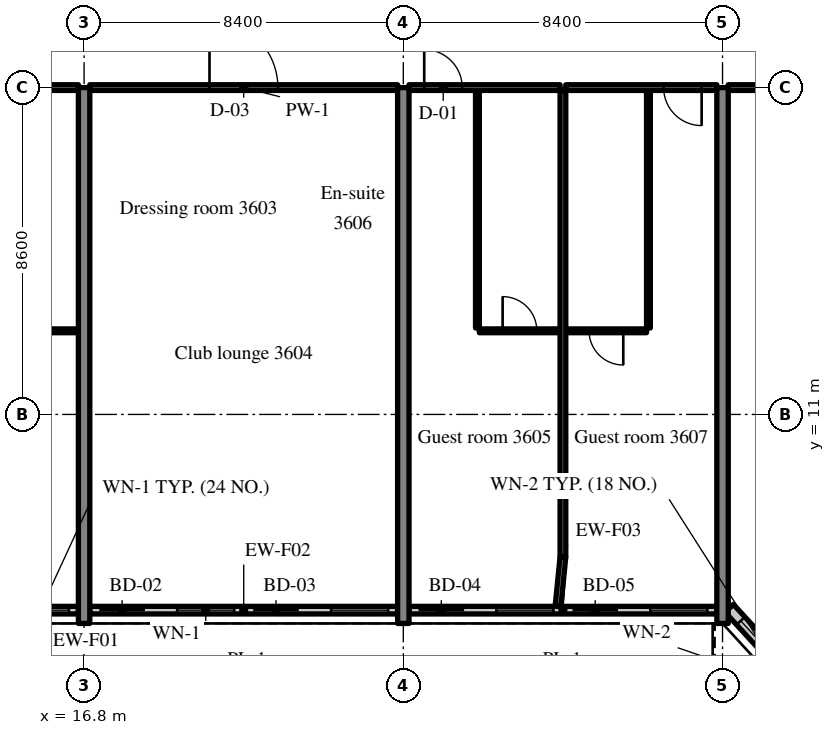
"""IFC4 building model, lengths in metres.
Left out: names, types, materials, properties, quantities, classifications, styles, units other than length and angle.
Written with IfcOpenShell. Run it as: python <this file> out.ifc"""

import sys

from ifc_helpers import new_model, si_unit, direction, frame, frame_2d, origin, place, context, subcontext, project, spatial, rectangle, extrude, source, transform, mapped, element, fill, save


model = new_model("IFC4")
c1 = context("Model", 3, precision=1e-05, world=origin(), true_north=direction((0.0, 1.0)))
c2 = subcontext(c1, "Body", "Model", "MODEL_VIEW")
j1 = project(units=[si_unit("LENGTHUNIT", "METRE"), si_unit("PLANEANGLEUNIT", "RADIAN")], contexts=[c1])
p1 = place(None, origin())
s1 = spatial("IfcSite", under=j1, at=p1, CompositionType="ELEMENT")
p2 = place(p1, origin())
s2 = spatial("IfcBuilding", under=s1, at=p2, CompositionType="ELEMENT")
p3 = place(p2, frame((0.0, 0.0, 151.6)))
s3 = spatial("IfcBuildingStorey", under=s2, at=p3, CompositionType="ELEMENT", Elevation=151.6)
m1 = source(origin(), c2, "Body", "SweptSolid", [
    extrude(rectangle(XDim=14.1, YDim=0.3, at=frame_2d((7.05, 0.0))), origin(), (0.0, 0.0, 1.0), 3.52),
])
for number, where, z_axis, x_axis in (
    (1, (16.8, 5.5, 0.0), (0.0, 0.0, 1.0), (0.0, 1.0, 0.0)),
    (2, (25.2, 5.5, 0.0), (0.0, 0.0, 1.0), (0.0, 1.0, 0.0)),
    (3, (33.6, 5.5, 0.0), (0.0, 0.0, 1.0), (0.0, 1.0, 0.0)),
):
    element("IfcWall", number, at=place(p3, frame(where, z_axis=z_axis, x_axis=x_axis)), inside=s3, PredefinedType="SHEAR", context=c2, shape_type="MappedRepresentation", body=[
        mapped(m1, transform((0.0, 0.0, 0.0), scale=1.0)),
    ])
m2 = source(origin(), c2, "Body", "SweptSolid", [
    extrude(rectangle(XDim=4.105, YDim=0.2, at=frame_2d((2.052, 0.0))), origin(), (0.0, 0.0, 1.0), 2.87),
])
p4 = place(p3, frame((12.545, 5.85, 0.0), z_axis=(0.0, 0.0, 1.0), x_axis=(1.0, 0.0, 0.0)))
e4 = element("IfcWall", 4, at=p4, inside=s3, PredefinedType="SOLIDWALL", context=c2, shape_type="MappedRepresentation", body=[
    mapped(m2, transform((0.0, 0.0, 0.0), scale=1.0)),
])
m3 = source(origin(), c2, "Body", "SweptSolid", [
    extrude(rectangle(XDim=1.2, YDim=2.4, at=frame_2d((0.6, 1.2))), frame((0.0, 0.11, 0.0), z_axis=(0.0, -1.0, 0.0), x_axis=(1.0, 0.0, 0.0)), (0.0, 0.0, 1.0), 0.22),
])
p5 = place(p4, frame((0.25, 0.0, 0.0)))
e5 = element("IfcOpeningElement", 5, at=p5, cuts=e4, PredefinedType="OPENING", context=c2, shape_type="MappedRepresentation", body=[
    mapped(m3, transform((0.0, 0.0, 0.0), scale=1.0)),
])
m4 = source(origin(), c2, "Body", "SweptSolid", [
    extrude(rectangle(XDim=1.5, YDim=1.5, at=frame_2d((0.75, 0.75))), frame((0.0, 0.11, 0.0), z_axis=(0.0, -1.0, 0.0), x_axis=(1.0, 0.0, 0.0)), (0.0, 0.0, 1.0), 0.22),
])
p6 = place(p4, frame((2.355, 0.0, 0.9)))
e6 = element("IfcOpeningElement", 6, at=p6, cuts=e4, PredefinedType="OPENING", context=c2, shape_type="MappedRepresentation", body=[
    mapped(m4, transform((0.0, 0.0, 0.0), scale=1.0)),
])
m5 = source(origin(), c2, "Body", "SweptSolid", [
    extrude(rectangle(XDim=8.1, YDim=0.2, at=frame_2d((4.05, 0.0))), origin(), (0.0, 0.0, 1.0), 2.87),
])
p7 = place(p3, frame((16.95, 5.85, 0.0), z_axis=(0.0, 0.0, 1.0), x_axis=(1.0, 0.0, 0.0)))
e7 = element("IfcWall", 7, at=p7, inside=s3, PredefinedType="SOLIDWALL", context=c2, shape_type="MappedRepresentation", body=[
    mapped(m5, transform((0.0, 0.0, 0.0), scale=1.0)),
])
p8 = place(p7, frame((0.25, 0.0, 0.0)))
e8 = element("IfcOpeningElement", 8, at=p8, cuts=e7, PredefinedType="OPENING", context=c2, shape_type="MappedRepresentation", body=[
    mapped(m3, transform((0.0, 0.0, 0.0), scale=1.0)),
])
p9 = place(p7, frame((2.3, 0.0, 0.9)))
e9 = element("IfcOpeningElement", 9, at=p9, cuts=e7, PredefinedType="OPENING", context=c2, shape_type="MappedRepresentation", body=[
    mapped(m4, transform((0.0, 0.0, 0.0), scale=1.0)),
])
p10 = place(p7, frame((4.3, 0.0, 0.0)))
e10 = element("IfcOpeningElement", 10, at=p10, cuts=e7, PredefinedType="OPENING", context=c2, shape_type="MappedRepresentation", body=[
    mapped(m3, transform((0.0, 0.0, 0.0), scale=1.0)),
])
p11 = place(p7, frame((6.35, 0.0, 0.9)))
e11 = element("IfcOpeningElement", 11, at=p11, cuts=e7, PredefinedType="OPENING", context=c2, shape_type="MappedRepresentation", body=[
    mapped(m4, transform((0.0, 0.0, 0.0), scale=1.0)),
])
m6 = source(origin(), c2, "Body", "SweptSolid", [
    extrude(rectangle(XDim=8.1, YDim=0.2, at=frame_2d((4.05, 0.0))), origin(), (0.0, 0.0, 1.0), 2.87),
])
p12 = place(p3, frame((25.35, 5.85, 0.0), z_axis=(0.0, 0.0, 1.0), x_axis=(1.0, 0.0, 0.0)))
e12 = element("IfcWall", 12, at=p12, inside=s3, PredefinedType="SOLIDWALL", context=c2, shape_type="MappedRepresentation", body=[
    mapped(m6, transform((0.0, 0.0, 0.0), scale=1.0)),
])
p13 = place(p12, frame((0.25, 0.0, 0.0)))
e13 = element("IfcOpeningElement", 13, at=p13, cuts=e12, PredefinedType="OPENING", context=c2, shape_type="MappedRepresentation", body=[
    mapped(m3, transform((0.0, 0.0, 0.0), scale=1.0)),
])
p14 = place(p12, frame((2.3, 0.0, 0.9)))
e14 = element("IfcOpeningElement", 14, at=p14, cuts=e12, PredefinedType="OPENING", context=c2, shape_type="MappedRepresentation", body=[
    mapped(m4, transform((0.0, 0.0, 0.0), scale=1.0)),
])
p15 = place(p12, frame((4.3, 0.0, 0.0)))
e15 = element("IfcOpeningElement", 15, at=p15, cuts=e12, PredefinedType="OPENING", context=c2, shape_type="MappedRepresentation", body=[
    mapped(m3, transform((0.0, 0.0, 0.0), scale=1.0)),
])
p16 = place(p12, frame((6.35, 0.0, 0.9)))
e16 = element("IfcOpeningElement", 16, at=p16, cuts=e12, PredefinedType="OPENING", context=c2, shape_type="MappedRepresentation", body=[
    mapped(m4, transform((0.0, 0.0, 0.0), scale=1.0)),
])
m7 = source(origin(), c2, "Body", "SweptSolid", [
    extrude(rectangle(XDim=2.398, YDim=0.3, at=frame_2d((1.199, 0.0))), origin(), (0.0, 0.0, 1.0), 3.52),
])
p17 = place(p3, frame((33.776, 5.9, 0.0), z_axis=(0.0, 0.0, 1.0), x_axis=(0.675374189419, -0.737475222815, 0.0)))
e17 = element("IfcWall", 17, at=p17, inside=s3, PredefinedType="SOLIDWALL", context=c2, shape_type="MappedRepresentation", body=[
    mapped(m7, transform((0.0, 0.0, 0.0), scale=1.0)),
])
m8 = source(origin(), c2, "Body", "SweptSolid", [
    extrude(rectangle(XDim=1.5, YDim=2.0, at=frame_2d((0.75, 1.0))), frame((0.0, 0.16, 0.0), z_axis=(0.0, -1.0, 0.0), x_axis=(1.0, 0.0, 0.0)), (0.0, 0.0, 1.0), 0.32),
])
p18 = place(p17, frame((0.449, 0.0, 0.9)))
e18 = element("IfcOpeningElement", 18, at=p18, cuts=e17, PredefinedType="OPENING", context=c2, shape_type="MappedRepresentation", body=[
    mapped(m8, transform((0.0, 0.0, 0.0), scale=1.0)),
])
m9 = source(origin(), c2, "Body", "SweptSolid", [
    extrude(rectangle(XDim=2.5, YDim=0.1, at=frame_2d((1.25, 0.0))), origin(), (0.0, 0.0, 1.0), 3.52),
])
p19 = place(p3, frame((14.15, 13.2, 0.0), z_axis=(0.0, 0.0, 1.0), x_axis=(1.0, 0.0, 0.0)))
e19 = element("IfcWall", 19, at=p19, inside=s3, PredefinedType="PARTITIONING", context=c2, shape_type="MappedRepresentation", body=[
    mapped(m9, transform((0.0, 0.0, 0.0), scale=1.0)),
])
m10 = source(origin(), c2, "Body", "SweptSolid", [
    extrude(rectangle(XDim=0.9, YDim=2.1, at=frame_2d((0.45, 1.05))), frame((0.0, 0.06, 0.0), z_axis=(0.0, -1.0, 0.0), x_axis=(1.0, 0.0, 0.0)), (0.0, 0.0, 1.0), 0.12),
])
p20 = place(p19, frame((0.8, 0.0, 0.0)))
e20 = element("IfcOpeningElement", 20, at=p20, cuts=e19, PredefinedType="OPENING", context=c2, shape_type="MappedRepresentation", body=[
    mapped(m10, transform((0.0, 0.0, 0.0), scale=1.0)),
])
m11 = source(origin(), c2, "Body", "SweptSolid", [
    extrude(rectangle(XDim=7.95, YDim=0.15, at=frame_2d((3.975, 0.0))), origin(), (0.0, 0.0, 1.0), 2.82),
])
p21 = place(p3, frame((8.7, 19.6, 0.0), z_axis=(0.0, 0.0, 1.0), x_axis=(1.0, 0.0, 0.0)))
e21 = element("IfcWall", 21, at=p21, inside=s3, PredefinedType="PARTITIONING", context=c2, shape_type="MappedRepresentation", body=[
    mapped(m11, transform((0.0, 0.0, 0.0), scale=1.0)),
])
m12 = source(origin(), c2, "Body", "SweptSolid", [
    extrude(rectangle(XDim=1.0, YDim=2.1, at=frame_2d((0.5, 1.05))), frame((0.0, 0.085, 0.0), z_axis=(0.0, -1.0, 0.0), x_axis=(1.0, 0.0, 0.0)), (0.0, 0.0, 1.0), 0.17),
])
p22 = place(p21, frame((0.4, 0.0, 0.0)))
e22 = element("IfcOpeningElement", 22, at=p22, cuts=e21, PredefinedType="OPENING", context=c2, shape_type="MappedRepresentation", body=[
    mapped(m12, transform((0.0, 0.0, 0.0), scale=1.0)),
])
m13 = source(origin(), c2, "Body", "SweptSolid", [
    extrude(rectangle(XDim=8.1, YDim=0.15, at=frame_2d((4.05, 0.0))), origin(), (0.0, 0.0, 1.0), 2.82),
])
p23 = place(p3, frame((16.95, 19.6, 0.0), z_axis=(0.0, 0.0, 1.0), x_axis=(1.0, 0.0, 0.0)))
e23 = element("IfcWall", 23, at=p23, inside=s3, PredefinedType="PARTITIONING", context=c2, shape_type="MappedRepresentation", body=[
    mapped(m13, transform((0.0, 0.0, 0.0), scale=1.0)),
])
m14 = source(origin(), c2, "Body", "SweptSolid", [
    extrude(rectangle(XDim=1.8, YDim=2.1, at=frame_2d((0.9, 1.05))), frame((0.0, 0.085, 0.0), z_axis=(0.0, -1.0, 0.0), x_axis=(1.0, 0.0, 0.0)), (0.0, 0.0, 1.0), 0.17),
])
p24 = place(p23, frame((3.15, 0.0, 0.0)))
e24 = element("IfcOpeningElement", 24, at=p24, cuts=e23, PredefinedType="OPENING", context=c2, shape_type="MappedRepresentation", body=[
    mapped(m14, transform((0.0, 0.0, 0.0), scale=1.0)),
])
m15 = source(origin(), c2, "Body", "SweptSolid", [
    extrude(rectangle(XDim=6.25, YDim=0.1, at=frame_2d((3.125, 0.0))), origin(), (0.0, 0.0, 1.0), 3.52),
])
p25 = place(p3, frame((27.15, 13.275, 0.0), z_axis=(0.0, 0.0, 1.0), x_axis=(0.0, 1.0, 0.0)))
e25 = element("IfcWall", 25, at=p25, inside=s3, PredefinedType="PARTITIONING", context=c2, shape_type="MappedRepresentation", body=[
    mapped(m15, transform((0.0, 0.0, 0.0), scale=1.0)),
])
m16 = source(origin(), c2, "Body", "SweptSolid", [
    extrude(rectangle(XDim=2.125, YDim=0.1, at=frame_2d((1.062, 0.0))), origin(), (0.0, 0.0, 1.0), 3.52),
])
p26 = place(p3, frame((27.2, 13.2, 0.0), z_axis=(0.0, 0.0, 1.0), x_axis=(1.0, 0.0, 0.0)))
e26 = element("IfcWall", 26, at=p26, inside=s3, PredefinedType="PARTITIONING", context=c2, shape_type="MappedRepresentation", body=[
    mapped(m16, transform((0.0, 0.0, 0.0), scale=1.0)),
])
p27 = place(p26, frame((0.613, 0.0, 0.0)))
e27 = element("IfcOpeningElement", 27, at=p27, cuts=e26, PredefinedType="OPENING", context=c2, shape_type="MappedRepresentation", body=[
    mapped(m10, transform((0.0, 0.0, 0.0), scale=1.0)),
])
m17 = source(origin(), c2, "Body", "SweptSolid", [
    extrude(rectangle(XDim=3.975, YDim=0.15, at=frame_2d((1.987, 0.0))), origin(), (0.0, 0.0, 1.0), 2.82),
])
p28 = place(p3, frame((25.35, 19.6, 0.0), z_axis=(0.0, 0.0, 1.0), x_axis=(1.0, 0.0, 0.0)))
e28 = element("IfcWall", 28, at=p28, inside=s3, PredefinedType="PARTITIONING", context=c2, shape_type="MappedRepresentation", body=[
    mapped(m17, transform((0.0, 0.0, 0.0), scale=1.0)),
])
p29 = place(p28, frame((0.4, 0.0, 0.0)))
e29 = element("IfcOpeningElement", 29, at=p29, cuts=e28, PredefinedType="OPENING", context=c2, shape_type="MappedRepresentation", body=[
    mapped(m12, transform((0.0, 0.0, 0.0), scale=1.0)),
])
p30 = place(p3, frame((31.65, 13.275, 0.0), z_axis=(0.0, 0.0, 1.0), x_axis=(0.0, 1.0, 0.0)))
e30 = element("IfcWall", 30, at=p30, inside=s3, PredefinedType="PARTITIONING", context=c2, shape_type="MappedRepresentation", body=[
    mapped(m15, transform((0.0, 0.0, 0.0), scale=1.0)),
])
p31 = place(p3, frame((29.475, 13.2, 0.0), z_axis=(0.0, 0.0, 1.0), x_axis=(1.0, 0.0, 0.0)))
e31 = element("IfcWall", 31, at=p31, inside=s3, PredefinedType="PARTITIONING", context=c2, shape_type="MappedRepresentation", body=[
    mapped(m16, transform((0.0, 0.0, 0.0), scale=1.0)),
])
p32 = place(p31, frame((0.613, 0.0, 0.0)))
e32 = element("IfcOpeningElement", 32, at=p32, cuts=e31, PredefinedType="OPENING", context=c2, shape_type="MappedRepresentation", body=[
    mapped(m10, transform((0.0, 0.0, 0.0), scale=1.0)),
])
p33 = place(p3, frame((29.475, 19.6, 0.0), z_axis=(0.0, 0.0, 1.0), x_axis=(1.0, 0.0, 0.0)))
e33 = element("IfcWall", 33, at=p33, inside=s3, PredefinedType="PARTITIONING", context=c2, shape_type="MappedRepresentation", body=[
    mapped(m17, transform((0.0, 0.0, 0.0), scale=1.0)),
])
p34 = place(p33, frame((2.575, 0.0, 0.0)))
e34 = element("IfcOpeningElement", 34, at=p34, cuts=e33, PredefinedType="OPENING", context=c2, shape_type="MappedRepresentation", body=[
    mapped(m12, transform((0.0, 0.0, 0.0), scale=1.0)),
])
m18 = source(origin(), c2, "Body", "SweptSolid", [
    extrude(rectangle(XDim=12.275, YDim=0.15, at=frame_2d((6.137, 0.0))), origin(), (0.0, 0.0, 1.0), 3.52),
])
p35 = place(p3, frame((29.4, 7.25, 0.0), z_axis=(0.0, 0.0, 1.0), x_axis=(0.0, 1.0, 0.0)))
e35 = element("IfcWall", 35, at=p35, inside=s3, PredefinedType="PARTITIONING", context=c2, shape_type="MappedRepresentation", body=[
    mapped(m18, transform((0.0, 0.0, 0.0), scale=1.0)),
])
p36 = place(p3, frame((33.75, 19.6, 0.0), z_axis=(0.0, 0.0, 1.0), x_axis=(1.0, 0.0, 0.0)))
e36 = element("IfcWall", 36, at=p36, inside=s3, PredefinedType="PARTITIONING", context=c2, shape_type="MappedRepresentation", body=[
    mapped(m13, transform((0.0, 0.0, 0.0), scale=1.0)),
])
p37 = place(p36, frame((3.15, 0.0, 0.0)))
e37 = element("IfcOpeningElement", 37, at=p37, cuts=e36, PredefinedType="OPENING", context=c2, shape_type="MappedRepresentation", body=[
    mapped(m14, transform((0.0, 0.0, 0.0), scale=1.0)),
])
m19 = source(origin(), c2, "Body", "SweptSolid", [
    extrude(rectangle(XDim=1.307, YDim=0.15, at=frame_2d((0.653, 0.0))), origin(), (0.0, 0.0, 1.0), 3.52),
])
p38 = place(p3, frame((29.27, 5.95, 0.0), z_axis=(0.0, 0.0, 1.0), x_axis=(0.099411212066, 0.995046436562, 0.0)))
e38 = element("IfcWall", 38, at=p38, inside=s3, PredefinedType="PARTITIONING", context=c2, shape_type="MappedRepresentation", body=[
    mapped(m19, transform((0.0, 0.0, 0.0), scale=1.0)),
])
m20 = source(origin(), c2, "Body", "SweptSolid", [
    extrude(rectangle(XDim=1.5, YDim=1.5, at=frame_2d((0.75, 0.75))), frame((0.0, 0.03, 0.0), z_axis=(0.0, -1.0, 0.0), x_axis=(1.0, 0.0, 0.0)), (0.0, 0.0, 1.0), 0.06),
])
p39 = place(p6, origin())
e39 = element("IfcWindow", 39, at=p39, inside=s3, PartitioningType="SINGLE_PANEL", PredefinedType="WINDOW", context=c2, shape_type="MappedRepresentation", body=[
    mapped(m20, transform((0.0, 0.0, 0.0), scale=1.0)),
])
fill(e6, e39)
m21 = source(origin(), c2, "Body", "SweptSolid", [
    extrude(rectangle(XDim=1.2, YDim=2.4, at=frame_2d((0.6, 1.2))), frame((0.0, 0.025, 0.0), z_axis=(0.0, -1.0, 0.0), x_axis=(1.0, 0.0, 0.0)), (0.0, 0.0, 1.0), 0.05),
])
p40 = place(p8, origin())
e40 = element("IfcDoor", 40, at=p40, inside=s3, OperationType="SLIDING_TO_RIGHT", PredefinedType="DOOR", context=c2, shape_type="MappedRepresentation", body=[
    mapped(m21, transform((0.0, 0.0, 0.0), scale=1.0)),
])
fill(e8, e40)
p41 = place(p9, origin())
e41 = element("IfcWindow", 41, at=p41, inside=s3, PartitioningType="SINGLE_PANEL", PredefinedType="WINDOW", context=c2, shape_type="MappedRepresentation", body=[
    mapped(m20, transform((0.0, 0.0, 0.0), scale=1.0)),
])
fill(e9, e41)
p42 = place(p10, origin())
e42 = element("IfcDoor", 42, at=p42, inside=s3, OperationType="SLIDING_TO_LEFT", PredefinedType="DOOR", context=c2, shape_type="MappedRepresentation", body=[
    mapped(m21, transform((0.0, 0.0, 0.0), scale=1.0)),
])
fill(e10, e42)
p43 = place(p11, origin())
e43 = element("IfcWindow", 43, at=p43, inside=s3, PartitioningType="SINGLE_PANEL", PredefinedType="WINDOW", context=c2, shape_type="MappedRepresentation", body=[
    mapped(m20, transform((0.0, 0.0, 0.0), scale=1.0)),
])
fill(e11, e43)
p44 = place(p13, origin())
e44 = element("IfcDoor", 44, at=p44, inside=s3, OperationType="SLIDING_TO_RIGHT", PredefinedType="DOOR", context=c2, shape_type="MappedRepresentation", body=[
    mapped(m21, transform((0.0, 0.0, 0.0), scale=1.0)),
])
fill(e13, e44)
p45 = place(p14, origin())
e45 = element("IfcWindow", 45, at=p45, inside=s3, PartitioningType="SINGLE_PANEL", PredefinedType="WINDOW", context=c2, shape_type="MappedRepresentation", body=[
    mapped(m20, transform((0.0, 0.0, 0.0), scale=1.0)),
])
fill(e14, e45)
p46 = place(p15, origin())
e46 = element("IfcDoor", 46, at=p46, inside=s3, OperationType="SLIDING_TO_LEFT", PredefinedType="DOOR", context=c2, shape_type="MappedRepresentation", body=[
    mapped(m21, transform((0.0, 0.0, 0.0), scale=1.0)),
])
fill(e15, e46)
p47 = place(p16, origin())
e47 = element("IfcWindow", 47, at=p47, inside=s3, PartitioningType="SINGLE_PANEL", PredefinedType="WINDOW", context=c2, shape_type="MappedRepresentation", body=[
    mapped(m20, transform((0.0, 0.0, 0.0), scale=1.0)),
])
fill(e16, e47)
m22 = source(origin(), c2, "Body", "SweptSolid", [
    extrude(rectangle(XDim=1.5, YDim=2.0, at=frame_2d((0.75, 1.0))), frame((0.0, 0.03, 0.0), z_axis=(0.0, -1.0, 0.0), x_axis=(1.0, 0.0, 0.0)), (0.0, 0.0, 1.0), 0.06),
])
p48 = place(p18, origin())
e48 = element("IfcWindow", 48, at=p48, inside=s3, PartitioningType="SINGLE_PANEL", PredefinedType="WINDOW", context=c2, shape_type="MappedRepresentation", body=[
    mapped(m22, transform((0.0, 0.0, 0.0), scale=1.0)),
])
fill(e18, e48)
m23 = source(origin(), c2, "Body", "SweptSolid", [
    extrude(rectangle(XDim=1.8, YDim=2.1, at=frame_2d((0.9, 1.05))), frame((0.0, 0.025, 0.0), z_axis=(0.0, -1.0, 0.0), x_axis=(1.0, 0.0, 0.0)), (0.0, 0.0, 1.0), 0.05),
])
p49 = place(p24, origin())
e49 = element("IfcDoor", 49, at=p49, inside=s3, OperationType="DOUBLE_DOOR_SINGLE_SWING", PredefinedType="DOOR", context=c2, shape_type="MappedRepresentation", body=[
    mapped(m23, transform((0.0, 0.0, 0.0), scale=1.0)),
])
fill(e24, e49)
m24 = source(origin(), c2, "Body", "SweptSolid", [
    extrude(rectangle(XDim=0.9, YDim=2.1, at=frame_2d((0.45, 1.05))), frame((0.0, 0.025, 0.0), z_axis=(0.0, -1.0, 0.0), x_axis=(1.0, 0.0, 0.0)), (0.0, 0.0, 1.0), 0.05),
])
p50 = place(p27, origin())
e50 = element("IfcDoor", 50, at=p50, inside=s3, OperationType="SINGLE_SWING_LEFT", PredefinedType="DOOR", context=c2, shape_type="MappedRepresentation", body=[
    mapped(m24, transform((0.0, 0.0, 0.0), scale=1.0)),
])
fill(e27, e50)
m25 = source(origin(), c2, "Body", "SweptSolid", [
    extrude(rectangle(XDim=1.0, YDim=2.1, at=frame_2d((0.5, 1.05))), frame((0.0, 0.025, 0.0), z_axis=(0.0, -1.0, 0.0), x_axis=(1.0, 0.0, 0.0)), (0.0, 0.0, 1.0), 0.05),
])
p51 = place(p29, origin())
e51 = element("IfcDoor", 51, at=p51, inside=s3, OperationType="SINGLE_SWING_LEFT", PredefinedType="DOOR", context=c2, shape_type="MappedRepresentation", body=[
    mapped(m25, transform((0.0, 0.0, 0.0), scale=1.0)),
])
fill(e29, e51)
p52 = place(p32, origin())
e52 = element("IfcDoor", 52, at=p52, inside=s3, OperationType="SINGLE_SWING_RIGHT", PredefinedType="DOOR", context=c2, shape_type="MappedRepresentation", body=[
    mapped(m24, transform((0.0, 0.0, 0.0), scale=1.0)),
])
fill(e32, e52)
p53 = place(p34, origin())
e53 = element("IfcDoor", 53, at=p53, inside=s3, OperationType="SINGLE_SWING_RIGHT", PredefinedType="DOOR", context=c2, shape_type="MappedRepresentation", body=[
    mapped(m25, transform((0.0, 0.0, 0.0), scale=1.0)),
])
fill(e34, e53)
save(model, sys.argv[1])
